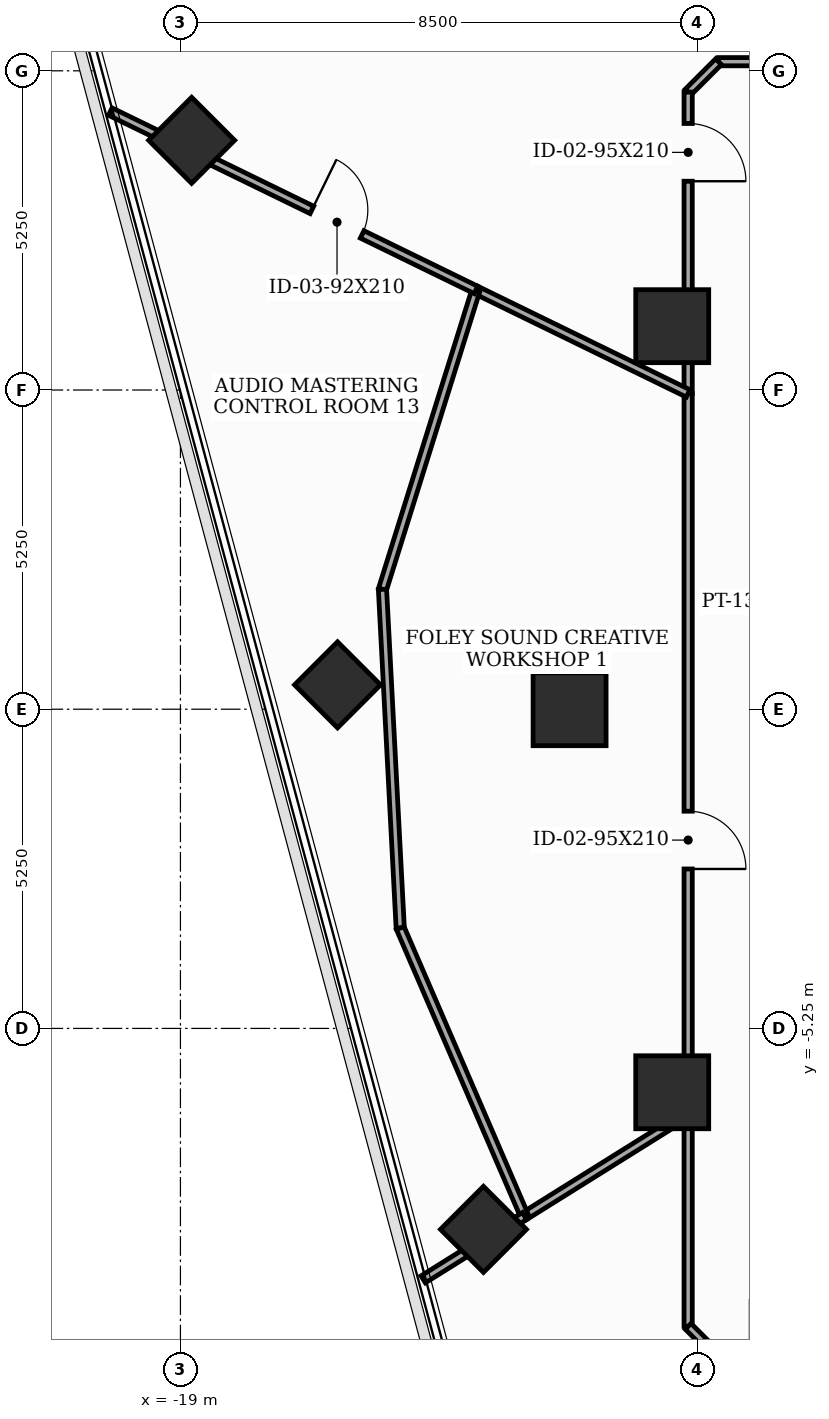
"""IFC4 building model, lengths in metres.
Left out: names, types, materials, properties, quantities, classifications, styles, units other than length and angle.
Written with IfcOpenShell. Run it as: python <this file> out.ifc"""

import sys

from ifc_helpers import new_model, si_unit, direction, frame, frame_2d, origin, origin_2d, place, context, subcontext, project, spatial, rectangle, extrude, element, fill, save


model = new_model("IFC4")
c1 = context("Model", 3, precision=1e-05, world=origin(), true_north=direction((0.0, 1.0)))
c2 = subcontext(c1, "Body", "Model", "MODEL_VIEW")
j1 = project(units=[si_unit("LENGTHUNIT", "METRE"), si_unit("PLANEANGLEUNIT", "RADIAN")], contexts=[c1])
p1 = place(None, origin())
s1 = spatial("IfcSite", under=j1, at=p1, CompositionType="ELEMENT")
p2 = place(p1, origin())
s2 = spatial("IfcBuilding", under=s1, at=p2, CompositionType="ELEMENT")
p3 = place(p2, frame((0.0, 0.0, 191.6)))
s3 = spatial("IfcBuildingStorey", under=s2, at=p3, CompositionType="ELEMENT", Elevation=191.6)
for number, where, z_axis, x_axis in (
    (1, (-10.912, 6.3, 0.0), (0.0, 0.0, 1.0), (1.0, 0.0, 0.0)),
    (2, (-12.6, 0.0, 0.0), (0.0, 0.0, 1.0), (1.0, 0.0, 0.0)),
    (3, (-10.912, -6.3, 0.0), (0.0, 0.0, 1.0), (1.0, 0.0, 0.0)),
):
    element("IfcColumn", number, at=place(p3, frame(where, z_axis=z_axis, x_axis=x_axis)), inside=s3, PredefinedType="COLUMN", context=c2, shape_type="SweptSolid", body=[
        extrude(rectangle(XDim=1.2, YDim=1.2, at=origin_2d()), origin(), (0.0, 0.0, 1.0), 3.7),
    ])
for number, where, z_axis, x_axis in (
    (4, (-18.816, 9.357, 0.0), (0.0, 0.0, 1.0), (0.707, 0.707, 0.0)),
    (5, (-16.416, 0.401, 0.0), (0.0, 0.0, 1.0), (0.707, 0.707, 0.0)),
    (6, (-14.016, -8.555, 0.0), (0.0, 0.0, 1.0), (0.707, 0.707, 0.0)),
):
    element("IfcColumn", number, at=place(p3, frame(where, z_axis=z_axis, x_axis=x_axis)), inside=s3, PredefinedType="COLUMN", context=c2, shape_type="SweptSolid", body=[
        extrude(rectangle(XDim=1.0, YDim=1.0, at=origin_2d()), origin(), (0.0, 0.0, 1.0), 3.7),
    ])
p4 = place(p3, frame((-10.65, 5.194, 0.0), z_axis=(0.0, 0.0, 1.0), x_axis=(0.0, -1.0, 0.0)))
e7 = element("IfcWall", 7, at=p4, inside=s3, PredefinedType="PARTITIONING", context=c2, shape_type="SweptSolid", body=[
    extrude(rectangle(XDim=11.849, YDim=0.135, at=frame_2d((5.925, 0.0))), origin(), (0.0, 0.0, 1.0), 2.885),
])
p5 = place(p4, frame((6.871, 0.0, 0.0)))
e8 = element("IfcOpeningElement", 8, at=p5, cuts=e7, PredefinedType="OPENING", context=c2, shape_type="SweptSolid", body=[
    extrude(rectangle(XDim=0.95, YDim=2.1, at=frame_2d((0.475, 1.05))), frame((0.0, 0.077, 0.0), z_axis=(0.0, -1.0, 0.0), x_axis=(1.0, 0.0, 0.0)), (0.0, 0.0, 1.0), 0.155),
])
p6 = place(p3, frame((-10.65, -6.655, 0.0), z_axis=(0.0, 0.0, 1.0), x_axis=(0.0, -1.0, 0.0)))
e9 = element("IfcWall", 9, at=p6, inside=s3, PredefinedType="PARTITIONING", context=c2, shape_type="SweptSolid", body=[
    extrude(rectangle(XDim=3.495, YDim=0.135, at=frame_2d((1.748, 0.0))), origin(), (0.0, 0.0, 1.0), 2.885),
])
p7 = place(p3, frame((-10.65, -10.15, 0.0), z_axis=(0.0, 0.0, 1.0), x_axis=(0.707106781187, -0.707106781187, 0.0)))
e10 = element("IfcWall", 10, at=p7, inside=s3, PredefinedType="PARTITIONING", context=c2, shape_type="SweptSolid", body=[
    extrude(rectangle(XDim=0.707, YDim=0.135, at=frame_2d((0.354, 0.0))), origin(), (0.0, 0.0, 1.0), 3.5),
])
p8 = place(p3, frame((-2.264, 10.65, 0.0), z_axis=(0.0, 0.0, 1.0), x_axis=(-1.0, 0.0, 0.0)))
e11 = element("IfcWall", 11, at=p8, inside=s3, PredefinedType="PARTITIONING", context=c2, shape_type="SweptSolid", body=[
    extrude(rectangle(XDim=7.886, YDim=0.135, at=frame_2d((3.943, 0.0))), origin(), (0.0, 0.0, 1.0), 2.885),
])
p9 = place(p3, frame((-10.15, 10.65, 0.0), z_axis=(0.0, 0.0, 1.0), x_axis=(-0.707106781187, -0.707106781187, 0.0)))
e12 = element("IfcWall", 12, at=p9, inside=s3, PredefinedType="PARTITIONING", context=c2, shape_type="SweptSolid", body=[
    extrude(rectangle(XDim=0.707, YDim=0.135, at=frame_2d((0.354, 0.0))), origin(), (0.0, 0.0, 1.0), 3.5),
])
p10 = place(p3, frame((-10.65, 10.15, 0.0), z_axis=(0.0, 0.0, 1.0), x_axis=(0.0, -1.0, 0.0)))
e13 = element("IfcWall", 13, at=p10, inside=s3, PredefinedType="PARTITIONING", context=c2, shape_type="SweptSolid", body=[
    extrude(rectangle(XDim=4.956, YDim=0.135, at=frame_2d((2.478, 0.0))), origin(), (0.0, 0.0, 1.0), 2.885),
])
p11 = place(p10, frame((0.516, 0.0, 0.0)))
e14 = element("IfcOpeningElement", 14, at=p11, cuts=e13, PredefinedType="OPENING", context=c2, shape_type="SweptSolid", body=[
    extrude(rectangle(XDim=0.95, YDim=2.1, at=frame_2d((0.475, 1.05))), frame((0.0, 0.077, 0.0), z_axis=(0.0, -1.0, 0.0), x_axis=(1.0, 0.0, 0.0)), (0.0, 0.0, 1.0), 0.155),
])
p12 = place(p3, frame((-13.341, -8.336, 0.0), z_axis=(0.0, 0.0, 1.0), x_axis=(0.848149563096, 0.529756848582, 0.0)))
e15 = element("IfcWall", 15, at=p12, inside=s3, PredefinedType="PARTITIONING", context=c2, shape_type="SweptSolid", body=[
    extrude(rectangle(XDim=3.173, YDim=0.135, at=frame_2d((1.586, 0.0))), origin(), (0.0, 0.0, 1.0), 2.885),
])
p13 = place(p3, frame((-10.65, 5.194, 0.0), z_axis=(0.0, 0.0, 1.0), x_axis=(-0.898773885441, 0.438412480261, 0.0)))
e16 = element("IfcWall", 16, at=p13, inside=s3, PredefinedType="PARTITIONING", context=c2, shape_type="SweptSolid", body=[
    extrude(rectangle(XDim=3.882, YDim=0.135, at=frame_2d((1.941, 0.0))), origin(), (0.0, 0.0, 1.0), 2.885),
])
p14 = place(p3, frame((-14.139, 6.896, 0.0), z_axis=(0.0, 0.0, 1.0), x_axis=(-0.298099863076, -0.954534688544, 0.0)))
e17 = element("IfcWall", 17, at=p14, inside=s3, PredefinedType="PARTITIONING", context=c2, shape_type="SweptSolid", body=[
    extrude(rectangle(XDim=5.16, YDim=0.135, at=frame_2d((2.58, 0.0))), origin(), (0.0, 0.0, 1.0), 3.5),
])
p15 = place(p3, frame((-15.677, 1.971, 0.0), z_axis=(0.0, 0.0, 1.0), x_axis=(0.052349772407, -0.998628810584, 0.0)))
e18 = element("IfcWall", 18, at=p15, inside=s3, PredefinedType="PARTITIONING", context=c2, shape_type="SweptSolid", body=[
    extrude(rectangle(XDim=5.578, YDim=0.135, at=frame_2d((2.789, 0.0))), origin(), (0.0, 0.0, 1.0), 2.985),
])
p16 = place(p3, frame((-15.385, -3.599, 0.0), z_axis=(0.0, 0.0, 1.0), x_axis=(0.396191247476, -0.918168010455, 0.0)))
e19 = element("IfcWall", 19, at=p16, inside=s3, PredefinedType="PARTITIONING", context=c2, shape_type="SweptSolid", body=[
    extrude(rectangle(XDim=5.159, YDim=0.135, at=frame_2d((2.58, 0.0))), origin(), (0.0, 0.0, 1.0), 2.985),
])
p17 = place(p3, frame((-13.341, -8.336, 0.0), z_axis=(0.0, 0.0, 1.0), x_axis=(-0.848033204961, -0.529943094382, 0.0)))
e20 = element("IfcWall", 20, at=p17, inside=s3, PredefinedType="PARTITIONING", context=c2, shape_type="SweptSolid", body=[
    extrude(rectangle(XDim=1.965, YDim=0.135, at=frame_2d((0.982, 0.0))), origin(), (0.0, 0.0, 1.0), 2.985),
])
p18 = place(p3, frame((-20.154, 9.829, 0.0), z_axis=(0.0, 0.0, 1.0), x_axis=(0.898812268895, -0.43833378296, 0.0)))
e21 = element("IfcWall", 21, at=p18, inside=s3, PredefinedType="PARTITIONING", context=c2, shape_type="SweptSolid", body=[
    extrude(rectangle(XDim=6.692, YDim=0.135, at=frame_2d((3.346, 0.0))), origin(), (0.0, 0.0, 1.0), 2.985),
])
p19 = place(p18, frame((3.689, 0.0, 0.0)))
e22 = element("IfcOpeningElement", 22, at=p19, cuts=e21, PredefinedType="OPENING", context=c2, shape_type="SweptSolid", body=[
    extrude(rectangle(XDim=0.92, YDim=2.1, at=frame_2d((0.46, 1.05))), frame((0.0, 0.077, 0.0), z_axis=(0.0, -1.0, 0.0), x_axis=(1.0, 0.0, 0.0)), (0.0, 0.0, 1.0), 0.155),
])
p20 = place(p5, origin())
e23 = element("IfcDoor", 23, at=p20, inside=s3, OperationType="SINGLE_SWING_RIGHT", PredefinedType="DOOR", context=c2, shape_type="SweptSolid", body=[
    extrude(rectangle(XDim=0.95, YDim=2.1, at=frame_2d((0.475, 1.05))), frame((0.0, 0.025, 0.0), z_axis=(0.0, -1.0, 0.0), x_axis=(1.0, 0.0, 0.0)), (0.0, 0.0, 1.0), 0.05),
])
fill(e8, e23)
p21 = place(p11, origin())
e24 = element("IfcDoor", 24, at=p21, inside=s3, OperationType="SINGLE_SWING_RIGHT", PredefinedType="DOOR", context=c2, shape_type="SweptSolid", body=[
    extrude(rectangle(XDim=0.95, YDim=2.1, at=frame_2d((0.475, 1.05))), frame((0.0, 0.025, 0.0), z_axis=(0.0, -1.0, 0.0), x_axis=(1.0, 0.0, 0.0)), (0.0, 0.0, 1.0), 0.05),
])
fill(e14, e24)
p22 = place(p19, origin())
e25 = element("IfcDoor", 25, at=p22, inside=s3, OperationType="SINGLE_SWING_LEFT", PredefinedType="DOOR", context=c2, shape_type="SweptSolid", body=[
    extrude(rectangle(XDim=0.92, YDim=2.1, at=frame_2d((0.46, 1.05))), frame((0.0, 0.025, 0.0), z_axis=(0.0, -1.0, 0.0), x_axis=(1.0, 0.0, 0.0)), (0.0, 0.0, 1.0), 0.05),
])
fill(e22, e25)
save(model, sys.argv[1])
